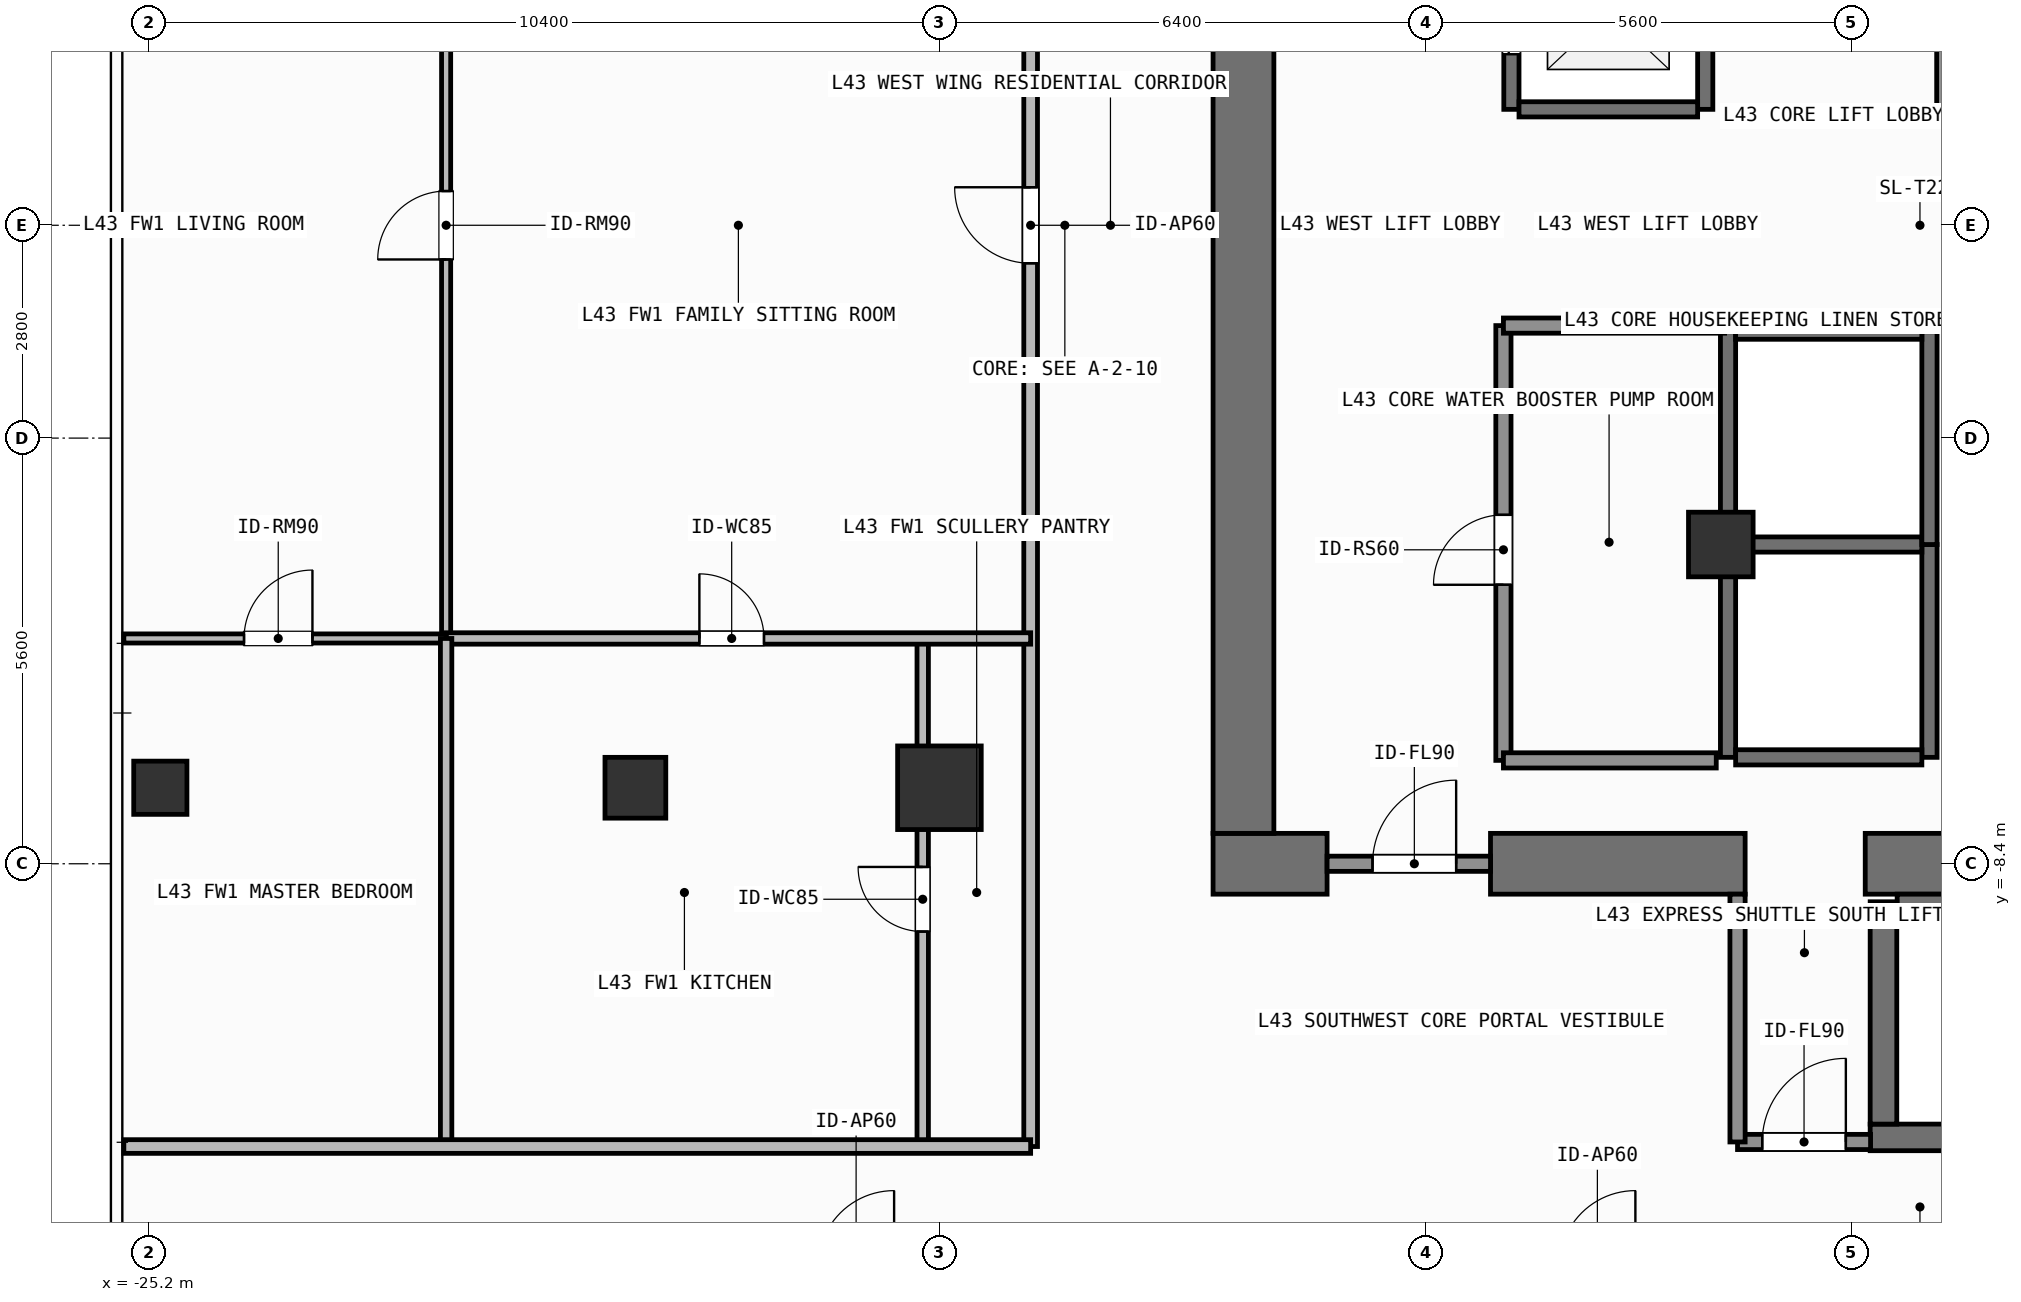
"""IFC4 building model, lengths in metres.
Left out: names, types, materials, properties, quantities, classifications, styles, units other than length and angle.
Written with IfcOpenShell. Run it as: python <this file> out.ifc"""

import sys

from ifc_helpers import new_model, si_unit, direction, frame, frame_2d, origin, origin_2d, place, context, subcontext, project, spatial, rectangle, hollow_rectangle, extrude, element, fill, save


model = new_model("IFC4")
c1 = context("Model", 3, precision=1e-05, world=origin(), true_north=direction((0.0, 1.0)))
c2 = subcontext(c1, "Body", "Model", "MODEL_VIEW")
j1 = project(units=[si_unit("LENGTHUNIT", "METRE"), si_unit("PLANEANGLEUNIT", "RADIAN")], contexts=[c1])
p1 = place(None, origin())
s1 = spatial("IfcSite", under=j1, at=p1, CompositionType="ELEMENT")
p2 = place(p1, origin())
s2 = spatial("IfcBuilding", under=s1, at=p2, CompositionType="ELEMENT")
p3 = place(p2, frame((0.0, 0.0, 175.8)))
s3 = spatial("IfcBuildingStorey", under=s2, at=p3, CompositionType="ELEMENT", Elevation=175.8)
p4 = place(p3, frame((-11.2, -8.4, 0.0), z_axis=(0.0, 0.0, 1.0), x_axis=(1.0, 0.0, 0.0)))
e1 = element("IfcWall", 1, at=p4, inside=s3, PredefinedType="SHEAR", context=c2, shape_type="SweptSolid", body=[
    extrude(rectangle(XDim=1.5, YDim=0.8, at=frame_2d((0.75, 0.0))), origin(), (0.0, 0.0, 1.0), 3.9),
])
p5 = place(p3, frame((-7.55, -8.4, 0.0), z_axis=(0.0, 0.0, 1.0), x_axis=(1.0, 0.0, 0.0)))
e2 = element("IfcWall", 2, at=p5, inside=s3, PredefinedType="SHEAR", context=c2, shape_type="SweptSolid", body=[
    extrude(rectangle(XDim=3.35, YDim=0.8, at=frame_2d((1.675, 0.0))), origin(), (0.0, 0.0, 1.0), 3.9),
])
p6 = place(p3, frame((-2.62, -8.4, 0.0), z_axis=(0.0, 0.0, 1.0), x_axis=(1.0, 0.0, 0.0)))
e3 = element("IfcWall", 3, at=p6, inside=s3, PredefinedType="SHEAR", context=c2, shape_type="SweptSolid", body=[
    extrude(rectangle(XDim=7.27, YDim=0.8, at=frame_2d((3.635, 0.0))), origin(), (0.0, 0.0, 1.0), 3.9),
])
p7 = place(p3, frame((-10.8, -8.0, 0.0), z_axis=(0.0, 0.0, 1.0), x_axis=(0.0, 1.0, 0.0)))
e4 = element("IfcWall", 4, at=p7, inside=s3, PredefinedType="SHEAR", context=c2, shape_type="SweptSolid", body=[
    extrude(rectangle(XDim=16.0, YDim=0.8, at=frame_2d((8.0, 0.0))), origin(), (0.0, 0.0, 1.0), 3.9),
])
p8 = place(p3, frame((-2.555, -12.0, 0.0), z_axis=(0.0, 0.0, 1.0), x_axis=(1.0, 0.0, 0.0)))
e5 = element("IfcWall", 5, at=p8, inside=s3, PredefinedType="SHEAR", context=c2, shape_type="SweptSolid", body=[
    extrude(rectangle(XDim=7.31, YDim=0.35, at=frame_2d((3.655, 0.0))), origin(), (0.0, 0.0, 1.0), 3.9),
])
p9 = place(p3, frame((-2.2, -8.913, 0.0), z_axis=(0.0, 0.0, 1.0), x_axis=(1.0, 0.0, 0.0)))
e6 = element("IfcWall", 6, at=p9, inside=s3, PredefinedType="SHEAR", context=c2, shape_type="SweptSolid", body=[
    extrude(rectangle(XDim=6.6, YDim=0.225, at=frame_2d((3.3, 0.0))), origin(), (0.0, 0.0, 1.0), 3.9),
])
p10 = place(p3, frame((-2.38, -11.825, 0.0), z_axis=(0.0, 0.0, 1.0), x_axis=(0.0, 1.0, 0.0)))
e7 = element("IfcWall", 7, at=p10, inside=s3, PredefinedType="SHEAR", context=c2, shape_type="SweptSolid", body=[
    extrude(rectangle(XDim=2.925, YDim=0.35, at=frame_2d((1.462, 0.0))), origin(), (0.0, 0.0, 1.0), 3.9),
])
p11 = place(p3, frame((-14.8, -7.4, 0.0), z_axis=(0.0, 0.0, 1.0), x_axis=(1.0, 0.0, 0.0)))
e8 = element("IfcColumn", 8, at=p11, inside=s3, PredefinedType="COLUMN", context=c2, shape_type="SweptSolid", body=[
    extrude(rectangle(XDim=1.1, YDim=1.1, at=origin_2d()), origin(), (0.0, 0.0, 1.0), 3.9),
])
p12 = place(p3, frame((-4.52, -4.2, 0.0), z_axis=(0.0, 0.0, 1.0), x_axis=(1.0, 0.0, 0.0)))
e9 = element("IfcColumn", 9, at=p12, inside=s3, PredefinedType="COLUMN", context=c2, shape_type="SweptSolid", body=[
    extrude(rectangle(XDim=0.85, YDim=0.85, at=origin_2d()), origin(), (0.0, 0.0, 1.0), 3.9),
])
p13 = place(p3, frame((-18.8, -7.4, 0.0), z_axis=(0.0, 0.0, 1.0), x_axis=(1.0, 0.0, 0.0)))
e10 = element("IfcColumn", 10, at=p13, inside=s3, PredefinedType="COLUMN", context=c2, shape_type="SweptSolid", body=[
    extrude(hollow_rectangle(XDim=0.8, YDim=0.8, WallThickness=0.036, at=origin_2d()), origin(), (0.0, 0.0, 1.0), 3.9),
])
p14 = place(p3, frame((-25.05, -7.4, 0.0), z_axis=(0.0, 0.0, 1.0), x_axis=(1.0, 0.0, 0.0)))
e11 = element("IfcColumn", 11, at=p14, inside=s3, PredefinedType="COLUMN", context=c2, shape_type="SweptSolid", body=[
    extrude(hollow_rectangle(XDim=0.7, YDim=0.7, WallThickness=0.032, at=origin_2d()), origin(), (0.0, 0.0, 1.0), 3.9),
])
p15 = place(p3, frame((-7.275, 1.525, 0.0), z_axis=(0.0, 0.0, 1.0), x_axis=(0.0, 1.0, 0.0)))
e12 = element("IfcWall", 12, at=p15, inside=s3, PredefinedType="SHEAR", context=c2, shape_type="SweptSolid", body=[
    extrude(rectangle(XDim=2.55, YDim=0.2, at=frame_2d((1.275, 0.0))), origin(), (0.0, 0.0, 1.0), 3.68),
])
p16 = place(p15, frame((0.725, 0.0, 0.0)))
e13 = element("IfcOpeningElement", 13, at=p16, cuts=e12, PredefinedType="OPENING", context=c2, shape_type="SweptSolid", body=[
    extrude(rectangle(XDim=1.1, YDim=2.2, at=frame_2d((0.55, 1.1))), frame((0.0, 0.11, 0.0), z_axis=(0.0, -1.0, 0.0), x_axis=(1.0, 0.0, 0.0)), (0.0, 0.0, 1.0), 0.22),
])
p17 = place(p3, frame((-4.725, 1.525, 0.0), z_axis=(0.0, 0.0, 1.0), x_axis=(0.0, 1.0, 0.0)))
e14 = element("IfcWall", 14, at=p17, inside=s3, PredefinedType="SHEAR", context=c2, shape_type="SweptSolid", body=[
    extrude(rectangle(XDim=2.55, YDim=0.2, at=frame_2d((1.275, 0.0))), origin(), (0.0, 0.0, 1.0), 3.68),
])
p18 = place(p3, frame((-7.175, 1.525, 0.0), z_axis=(0.0, 0.0, 1.0), x_axis=(1.0, 0.0, 0.0)))
e15 = element("IfcWall", 15, at=p18, inside=s3, PredefinedType="SHEAR", context=c2, shape_type="SweptSolid", body=[
    extrude(rectangle(XDim=2.35, YDim=0.2, at=frame_2d((1.175, 0.0))), origin(), (0.0, 0.0, 1.0), 3.68),
])
for number, where, z_axis, x_axis in (
    (16, (-4.425, -7.0, 0.0), (0.0, 0.0, 1.0), (0.0, 1.0, 0.0)),
    (17, (-1.775, -7.0, 0.0), (0.0, 0.0, 1.0), (0.0, 1.0, 0.0)),
):
    element("IfcWall", number, at=place(p3, frame(where, z_axis=z_axis, x_axis=x_axis)), inside=s3, PredefinedType="SHEAR", context=c2, shape_type="SweptSolid", body=[
        extrude(rectangle(XDim=2.8, YDim=0.2, at=frame_2d((1.4, 0.0))), origin(), (0.0, 0.0, 1.0), 3.68),
    ])
for number, where, z_axis, x_axis in (
    (18, (-4.325, -7.0, 0.0), (0.0, 0.0, 1.0), (1.0, 0.0, 0.0)),
    (19, (-4.325, -4.2, 0.0), (0.0, 0.0, 1.0), (1.0, 0.0, 0.0)),
):
    element("IfcWall", number, at=place(p3, frame(where, z_axis=z_axis, x_axis=x_axis)), inside=s3, PredefinedType="SHEAR", context=c2, shape_type="SweptSolid", body=[
        extrude(rectangle(XDim=2.45, YDim=0.2, at=frame_2d((1.225, 0.0))), origin(), (0.0, 0.0, 1.0), 3.68),
    ])
for number, where, z_axis, x_axis in (
    (20, (-4.425, -4.2, 0.0), (0.0, 0.0, 1.0), (0.0, 1.0, 0.0)),
    (21, (-1.775, -4.2, 0.0), (0.0, 0.0, 1.0), (0.0, 1.0, 0.0)),
):
    element("IfcWall", number, at=place(p3, frame(where, z_axis=z_axis, x_axis=x_axis)), inside=s3, PredefinedType="SHEAR", context=c2, shape_type="SweptSolid", body=[
        extrude(rectangle(XDim=2.8, YDim=0.2, at=frame_2d((1.4, 0.0))), origin(), (0.0, 0.0, 1.0), 3.68),
    ])
p19 = place(p3, frame((-4.325, -1.4, 0.0), z_axis=(0.0, 0.0, 1.0), x_axis=(1.0, 0.0, 0.0)))
e22 = element("IfcWall", 22, at=p19, inside=s3, PredefinedType="SHEAR", context=c2, shape_type="SweptSolid", body=[
    extrude(rectangle(XDim=2.45, YDim=0.2, at=frame_2d((1.225, 0.0))), origin(), (0.0, 0.0, 1.0), 3.68),
])
p20 = place(p3, frame((-9.7, -8.4, 0.0), z_axis=(0.0, 0.0, 1.0), x_axis=(1.0, 0.0, 0.0)))
e23 = element("IfcWall", 23, at=p20, inside=s3, PredefinedType="SOLIDWALL", context=c2, shape_type="SweptSolid", body=[
    extrude(rectangle(XDim=2.15, YDim=0.2, at=frame_2d((1.075, 0.0))), origin(), (0.0, 0.0, 1.0), 2.82),
])
p21 = place(p20, frame((0.598, 0.0, 0.0)))
e24 = element("IfcOpeningElement", 24, at=p21, cuts=e23, PredefinedType="OPENING", context=c2, shape_type="SweptSolid", body=[
    extrude(rectangle(XDim=1.1, YDim=2.15, at=frame_2d((0.55, 1.075))), frame((0.0, 0.11, 0.0), z_axis=(0.0, -1.0, 0.0), x_axis=(1.0, 0.0, 0.0)), (0.0, 0.0, 1.0), 0.22),
])
p22 = place(p3, frame((-4.3, -12.06, 0.0), z_axis=(0.0, 0.0, 1.0), x_axis=(1.0, 0.0, 0.0)))
e25 = element("IfcWall", 25, at=p22, inside=s3, PredefinedType="SOLIDWALL", context=c2, shape_type="SweptSolid", body=[
    extrude(rectangle(XDim=1.75, YDim=0.2, at=frame_2d((0.875, 0.0))), origin(), (0.0, 0.0, 1.0), 3.68),
])
p23 = place(p22, frame((0.325, 0.0, 0.0)))
e26 = element("IfcOpeningElement", 26, at=p23, cuts=e25, PredefinedType="OPENING", context=c2, shape_type="SweptSolid", body=[
    extrude(rectangle(XDim=1.1, YDim=2.15, at=frame_2d((0.55, 1.075))), frame((0.0, 0.11, 0.0), z_axis=(0.0, -1.0, 0.0), x_axis=(1.0, 0.0, 0.0)), (0.0, 0.0, 1.0), 0.22),
])
p24 = place(p3, frame((-7.38, -7.04, 0.0), z_axis=(0.0, 0.0, 1.0), x_axis=(0.0, 1.0, 0.0)))
e27 = element("IfcWall", 27, at=p24, inside=s3, PredefinedType="SOLIDWALL", context=c2, shape_type="SweptSolid", body=[
    extrude(rectangle(XDim=5.72, YDim=0.2, at=frame_2d((2.86, 0.0))), origin(), (0.0, 0.0, 1.0), 3.68),
])
p25 = place(p24, frame((2.31, 0.0, 0.0)))
e28 = element("IfcOpeningElement", 28, at=p25, cuts=e27, PredefinedType="OPENING", context=c2, shape_type="SweptSolid", body=[
    extrude(rectangle(XDim=0.92, YDim=2.1, at=frame_2d((0.46, 1.05))), frame((0.0, 0.11, 0.0), z_axis=(0.0, -1.0, 0.0), x_axis=(1.0, 0.0, 0.0)), (0.0, 0.0, 1.0), 0.22),
])
p26 = place(p3, frame((-13.6, -12.12, 0.0), z_axis=(0.0, 0.0, 1.0), x_axis=(0.0, 1.0, 0.0)))
e29 = element("IfcWall", 29, at=p26, inside=s3, PredefinedType="PARTITIONING", context=c2, shape_type="SweptSolid", body=[
    extrude(rectangle(XDim=24.24, YDim=0.18, at=frame_2d((12.12, 0.0))), origin(), (0.0, 0.0, 1.0), 3.68),
])
p27 = place(p26, frame((11.62, 0.0, 0.0)))
e30 = element("IfcOpeningElement", 30, at=p27, cuts=e29, PredefinedType="OPENING", context=c2, shape_type="SweptSolid", body=[
    extrude(rectangle(XDim=1.0, YDim=2.2, at=frame_2d((0.5, 1.1))), frame((0.0, 0.1, 0.0), z_axis=(0.0, -1.0, 0.0), x_axis=(1.0, 0.0, 0.0)), (0.0, 0.0, 1.0), 0.2),
])
p28 = place(p3, frame((-21.29, -5.436, 0.0), z_axis=(0.0, 0.0, 1.0), x_axis=(0.0, 1.0, 0.0)))
e31 = element("IfcWall", 31, at=p28, inside=s3, PredefinedType="PARTITIONING", context=c2, shape_type="SweptSolid", body=[
    extrude(rectangle(XDim=10.872, YDim=0.12, at=frame_2d((5.436, 0.0))), origin(), (0.0, 0.0, 1.0), 3.68),
])
p29 = place(p28, frame((4.986, 0.0, 0.0)))
e32 = element("IfcOpeningElement", 32, at=p29, cuts=e31, PredefinedType="OPENING", context=c2, shape_type="SweptSolid", body=[
    extrude(rectangle(XDim=0.9, YDim=2.1, at=frame_2d((0.45, 1.05))), frame((0.0, 0.07, 0.0), z_axis=(0.0, -1.0, 0.0), x_axis=(1.0, 0.0, 0.0)), (0.0, 0.0, 1.0), 0.14),
])
p30 = place(p3, frame((-15.02, -12.12, 0.0), z_axis=(0.0, 0.0, 1.0), x_axis=(0.0, 1.0, 0.0)))
e33 = element("IfcWall", 33, at=p30, inside=s3, PredefinedType="PARTITIONING", context=c2, shape_type="SweptSolid", body=[
    extrude(rectangle(XDim=6.684, YDim=0.15, at=frame_2d((3.342, 0.0))), origin(), (0.0, 0.0, 1.0), 3.082),
])
p31 = place(p30, frame((2.828, 0.0, 0.0)))
e34 = element("IfcOpeningElement", 34, at=p31, cuts=e33, PredefinedType="OPENING", context=c2, shape_type="SweptSolid", body=[
    extrude(rectangle(XDim=0.85, YDim=2.1, at=frame_2d((0.425, 1.05))), frame((0.0, 0.085, 0.0), z_axis=(0.0, -1.0, 0.0), x_axis=(1.0, 0.0, 0.0)), (0.0, 0.0, 1.0), 0.17),
])
p32 = place(p3, frame((-21.29, -5.436, 0.0), z_axis=(0.0, 0.0, 1.0), x_axis=(1.0, 0.0, 0.0)))
e35 = element("IfcWall", 35, at=p32, inside=s3, PredefinedType="PARTITIONING", context=c2, shape_type="SweptSolid", body=[
    extrude(rectangle(XDim=7.69, YDim=0.15, at=frame_2d((3.845, 0.0))), origin(), (0.0, 0.0, 1.0), 3.68),
])
p33 = place(p32, frame((3.332, 0.0, 0.0)))
e36 = element("IfcOpeningElement", 36, at=p33, cuts=e35, PredefinedType="OPENING", context=c2, shape_type="SweptSolid", body=[
    extrude(rectangle(XDim=0.85, YDim=2.1, at=frame_2d((0.425, 1.05))), frame((0.0, 0.085, 0.0), z_axis=(0.0, -1.0, 0.0), x_axis=(1.0, 0.0, 0.0)), (0.0, 0.0, 1.0), 0.17),
])
p34 = place(p3, frame((-25.53, -5.436, 0.0), z_axis=(0.0, 0.0, 1.0), x_axis=(1.0, 0.0, 0.0)))
e37 = element("IfcWall", 37, at=p34, inside=s3, PredefinedType="PARTITIONING", context=c2, shape_type="SweptSolid", body=[
    extrude(rectangle(XDim=4.24, YDim=0.12, at=frame_2d((2.12, 0.0))), origin(), (0.0, 0.0, 1.0), 3.68),
])
p35 = place(p34, frame((1.581, 0.0, 0.0)))
e38 = element("IfcOpeningElement", 38, at=p35, cuts=e37, PredefinedType="OPENING", context=c2, shape_type="SweptSolid", body=[
    extrude(rectangle(XDim=0.9, YDim=2.1, at=frame_2d((0.45, 1.05))), frame((0.0, 0.07, 0.0), z_axis=(0.0, -1.0, 0.0), x_axis=(1.0, 0.0, 0.0)), (0.0, 0.0, 1.0), 0.14),
])
p36 = place(p3, frame((-4.3, -12.06, 0.0), z_axis=(0.0, 0.0, 1.0), x_axis=(0.0, 1.0, 0.0)))
e39 = element("IfcWall", 39, at=p36, inside=s3, PredefinedType="SOLIDWALL", context=c2, shape_type="SweptSolid", body=[
    extrude(rectangle(XDim=3.26, YDim=0.2, at=frame_2d((1.63, 0.0))), origin(), (0.0, 0.0, 1.0), 3.68),
])
p37 = place(p3, frame((-7.38, -1.32, 0.0), z_axis=(0.0, 0.0, 1.0), x_axis=(1.0, 0.0, 0.0)))
e40 = element("IfcWall", 40, at=p37, inside=s3, PredefinedType="SOLIDWALL", context=c2, shape_type="SweptSolid", body=[
    extrude(rectangle(XDim=2.91, YDim=0.2, at=frame_2d((1.455, 0.0))), origin(), (0.0, 0.0, 1.0), 3.68),
])
p38 = place(p3, frame((-1.58, 1.48, 0.0), z_axis=(0.0, 0.0, 1.0), x_axis=(0.0, 1.0, 0.0)))
e41 = element("IfcWall", 41, at=p38, inside=s3, PredefinedType="SOLIDWALL", context=c2, shape_type="SweptSolid", body=[
    extrude(rectangle(XDim=2.7, YDim=0.2, at=frame_2d((1.35, 0.0))), origin(), (0.0, 0.0, 1.0), 3.68),
])
p39 = place(p3, frame((-7.38, -7.04, 0.0), z_axis=(0.0, 0.0, 1.0), x_axis=(1.0, 0.0, 0.0)))
e42 = element("IfcWall", 42, at=p39, inside=s3, PredefinedType="SOLIDWALL", context=c2, shape_type="SweptSolid", body=[
    extrude(rectangle(XDim=2.8, YDim=0.2, at=frame_2d((1.4, 0.0))), origin(), (0.0, 0.0, 1.0), 3.68),
])
p40 = place(p3, frame((-21.29, -12.12, 0.0), z_axis=(0.0, 0.0, 1.0), x_axis=(0.0, 1.0, 0.0)))
e43 = element("IfcWall", 43, at=p40, inside=s3, PredefinedType="PARTITIONING", context=c2, shape_type="SweptSolid", body=[
    extrude(rectangle(XDim=6.684, YDim=0.15, at=frame_2d((3.342, 0.0))), origin(), (0.0, 0.0, 1.0), 3.68),
])
p41 = place(p3, frame((-25.53, -12.12, 0.0), z_axis=(0.0, 0.0, 1.0), x_axis=(1.0, 0.0, 0.0)))
e44 = element("IfcWall", 44, at=p41, inside=s3, PredefinedType="PARTITIONING", context=c2, shape_type="SweptSolid", body=[
    extrude(rectangle(XDim=11.93, YDim=0.18, at=frame_2d((5.965, 0.0))), origin(), (0.0, 0.0, 1.0), 3.68),
])
p42 = place(p16, origin())
e45 = element("IfcDoor", 45, at=p42, inside=s3, OperationType="SLIDING_TO_LEFT", PredefinedType="DOOR", context=c2, shape_type="SweptSolid", body=[
    extrude(rectangle(XDim=1.1, YDim=2.2, at=frame_2d((0.55, 1.1))), frame((0.0, 0.025, 0.0), z_axis=(0.0, -1.0, 0.0), x_axis=(1.0, 0.0, 0.0)), (0.0, 0.0, 1.0), 0.05),
])
fill(e13, e45)
p43 = place(p21, origin())
e46 = element("IfcDoor", 46, at=p43, inside=s3, OperationType="SINGLE_SWING_RIGHT", PredefinedType="DOOR", context=c2, shape_type="SweptSolid", body=[
    extrude(rectangle(XDim=1.1, YDim=2.15, at=frame_2d((0.55, 1.075))), frame((0.0, 0.025, 0.0), z_axis=(0.0, -1.0, 0.0), x_axis=(1.0, 0.0, 0.0)), (0.0, 0.0, 1.0), 0.05),
])
fill(e24, e46)
p44 = place(p23, origin())
e47 = element("IfcDoor", 47, at=p44, inside=s3, OperationType="SINGLE_SWING_RIGHT", PredefinedType="DOOR", context=c2, shape_type="SweptSolid", body=[
    extrude(rectangle(XDim=1.1, YDim=2.15, at=frame_2d((0.55, 1.075))), frame((0.0, 0.025, 0.0), z_axis=(0.0, -1.0, 0.0), x_axis=(1.0, 0.0, 0.0)), (0.0, 0.0, 1.0), 0.05),
])
fill(e26, e47)
p45 = place(p25, origin())
e48 = element("IfcDoor", 48, at=p45, inside=s3, OperationType="SINGLE_SWING_LEFT", PredefinedType="DOOR", context=c2, shape_type="SweptSolid", body=[
    extrude(rectangle(XDim=0.92, YDim=2.1, at=frame_2d((0.46, 1.05))), frame((0.0, 0.025, 0.0), z_axis=(0.0, -1.0, 0.0), x_axis=(1.0, 0.0, 0.0)), (0.0, 0.0, 1.0), 0.05),
])
fill(e28, e48)
p46 = place(p27, origin())
e49 = element("IfcDoor", 49, at=p46, inside=s3, OperationType="SINGLE_SWING_RIGHT", PredefinedType="DOOR", context=c2, shape_type="SweptSolid", body=[
    extrude(rectangle(XDim=1.0, YDim=2.2, at=frame_2d((0.5, 1.1))), frame((0.0, 0.025, 0.0), z_axis=(0.0, -1.0, 0.0), x_axis=(1.0, 0.0, 0.0)), (0.0, 0.0, 1.0), 0.05),
])
fill(e30, e49)
p47 = place(p29, origin())
e50 = element("IfcDoor", 50, at=p47, inside=s3, OperationType="SINGLE_SWING_LEFT", PredefinedType="DOOR", context=c2, shape_type="SweptSolid", body=[
    extrude(rectangle(XDim=0.9, YDim=2.1, at=frame_2d((0.45, 1.05))), frame((0.0, 0.025, 0.0), z_axis=(0.0, -1.0, 0.0), x_axis=(1.0, 0.0, 0.0)), (0.0, 0.0, 1.0), 0.05),
])
fill(e32, e50)
p48 = place(p31, origin())
e51 = element("IfcDoor", 51, at=p48, inside=s3, OperationType="SINGLE_SWING_RIGHT", PredefinedType="DOOR", context=c2, shape_type="SweptSolid", body=[
    extrude(rectangle(XDim=0.85, YDim=2.1, at=frame_2d((0.425, 1.05))), frame((0.0, 0.025, 0.0), z_axis=(0.0, -1.0, 0.0), x_axis=(1.0, 0.0, 0.0)), (0.0, 0.0, 1.0), 0.05),
])
fill(e34, e51)
p49 = place(p33, origin())
e52 = element("IfcDoor", 52, at=p49, inside=s3, OperationType="SINGLE_SWING_LEFT", PredefinedType="DOOR", context=c2, shape_type="SweptSolid", body=[
    extrude(rectangle(XDim=0.85, YDim=2.1, at=frame_2d((0.425, 1.05))), frame((0.0, 0.025, 0.0), z_axis=(0.0, -1.0, 0.0), x_axis=(1.0, 0.0, 0.0)), (0.0, 0.0, 1.0), 0.05),
])
fill(e36, e52)
p50 = place(p35, origin())
e53 = element("IfcDoor", 53, at=p50, inside=s3, OperationType="SINGLE_SWING_RIGHT", PredefinedType="DOOR", context=c2, shape_type="SweptSolid", body=[
    extrude(rectangle(XDim=0.9, YDim=2.1, at=frame_2d((0.45, 1.05))), frame((0.0, 0.025, 0.0), z_axis=(0.0, -1.0, 0.0), x_axis=(1.0, 0.0, 0.0)), (0.0, 0.0, 1.0), 0.05),
])
fill(e38, e53)
save(model, sys.argv[1])
